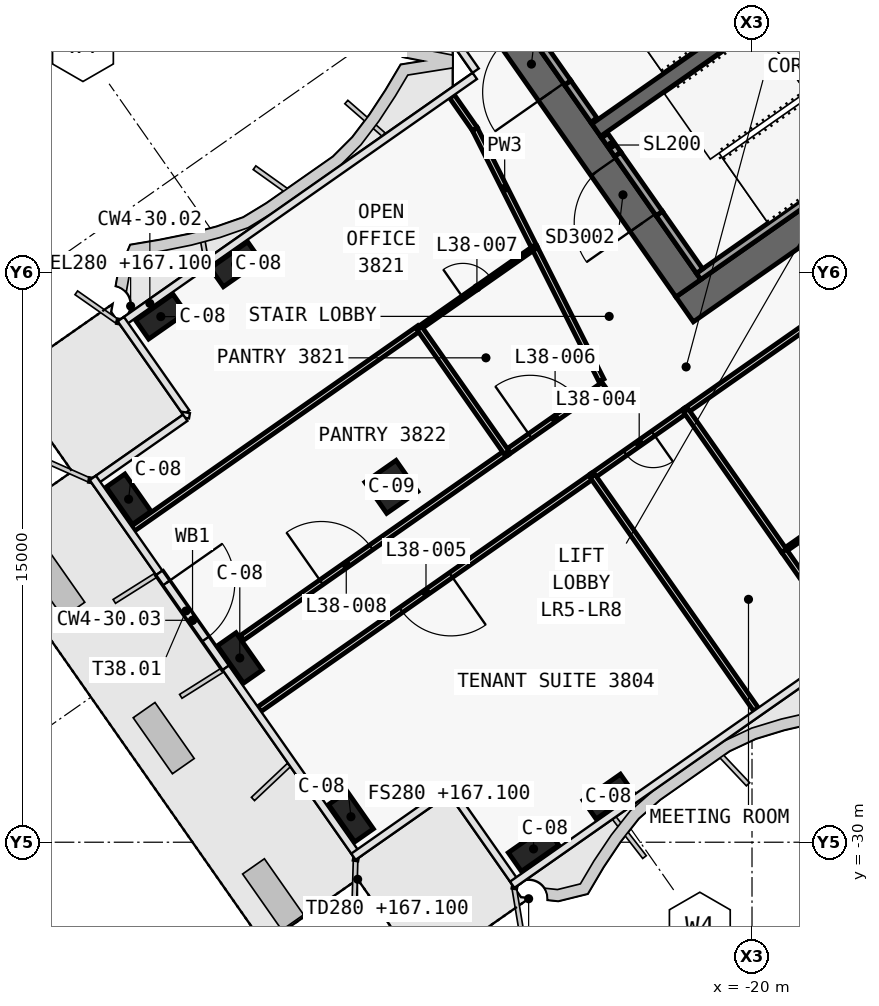
"""IFC4 building model, lengths in metres.
Left out: names, types, materials, properties, quantities, classifications, styles, units other than length and angle.
Written with IfcOpenShell. Run it as: python <this file> out.ifc"""

import sys

from ifc_helpers import new_model, si_unit, direction, frame, frame_2d, origin, origin_2d, place, context, subcontext, project, spatial, polyline, rectangle, outline, extrude, element, fill, save


model = new_model("IFC4")
c1 = context("Model", 3, precision=1e-05, world=origin(), true_north=direction((0.0, 1.0)))
c2 = subcontext(c1, "Body", "Model", "MODEL_VIEW")
j1 = project(units=[si_unit("LENGTHUNIT", "METRE"), si_unit("PLANEANGLEUNIT", "RADIAN")], contexts=[c1])
p1 = place(None, origin())
s1 = spatial("IfcSite", under=j1, at=p1, CompositionType="ELEMENT")
p2 = place(p1, origin())
s2 = spatial("IfcBuilding", under=s1, at=p2, CompositionType="ELEMENT")
p3 = place(p2, frame((0.0, 0.0, 167.1)))
s3 = spatial("IfcBuildingStorey", under=s2, at=p3, CompositionType="ELEMENT", Elevation=167.1)
p4 = place(p3, frame((0.029, -0.712, 0.0), z_axis=(0.0, 0.0, 1.0), x_axis=(-0.819151758019, -0.573576845187, 0.0)))
e1 = element("IfcWall", 1, at=p4, inside=s3, PredefinedType="SHEAR", context=c2, shape_type="SweptSolid", body=[
    extrude(outline(polyline([(26.616, 0.4), (0.56, 0.4), (-0.0, -0.4), (26.616, -0.4), (26.616, 0.4)])), origin(), (0.0, 0.0, 1.0), 3.9),
])
p5 = place(p4, frame((2.966, 0.0, 0.0)))
e2 = element("IfcOpeningElement", 2, at=p5, cuts=e1, PredefinedType="OPENING", context=c2, shape_type="SweptSolid", body=[
    extrude(rectangle(XDim=2.4, YDim=2.1, at=frame_2d((1.2, 1.05))), frame((0.0, 0.41, 0.0), z_axis=(0.0, -1.0, 0.0), x_axis=(1.0, 0.0, 0.0)), (0.0, 0.0, 1.0), 0.82),
])
p6 = place(p4, frame((11.916, 0.0, 0.0)))
e3 = element("IfcOpeningElement", 3, at=p6, cuts=e1, PredefinedType="OPENING", context=c2, shape_type="SweptSolid", body=[
    extrude(rectangle(XDim=2.4, YDim=2.1, at=frame_2d((1.2, 1.05))), frame((0.0, 0.41, 0.0), z_axis=(0.0, -1.0, 0.0), x_axis=(1.0, 0.0, 0.0)), (0.0, 0.0, 1.0), 0.82),
])
p7 = place(p3, frame((-21.675, -15.421, 0.0), z_axis=(0.0, 0.0, 1.0), x_axis=(-0.573581815061, 0.819148278049, 0.0)))
e4 = element("IfcWall", 4, at=p7, inside=s3, PredefinedType="SHEAR", context=c2, shape_type="SweptSolid", body=[
    extrude(outline(polyline([(0.0, 0.4), (0.0, -0.4), (9.6, -0.4), (9.6, 0.4), (0.0, 0.4)])), origin(), (0.0, 0.0, 1.0), 3.9),
])
p8 = place(p7, frame((6.3, 0.0, 0.0)))
e5 = element("IfcOpeningElement", 5, at=p8, cuts=e4, PredefinedType="OPENING", context=c2, shape_type="SweptSolid", body=[
    extrude(rectangle(XDim=1.8, YDim=2.1, at=frame_2d((0.9, 1.05))), frame((0.0, 0.41, 0.0), z_axis=(0.0, -1.0, 0.0), x_axis=(1.0, 0.0, 0.0)), (0.0, 0.0, 1.0), 0.82),
])
p9 = place(p7, frame((2.1, 0.0, 0.0)))
e6 = element("IfcOpeningElement", 6, at=p9, cuts=e4, PredefinedType="OPENING", context=c2, shape_type="SweptSolid", body=[
    extrude(rectangle(XDim=1.8, YDim=2.1, at=frame_2d((0.9, 1.05))), frame((0.0, 0.41, 0.0), z_axis=(0.0, -1.0, 0.0), x_axis=(1.0, 0.0, 0.0)), (0.0, 0.0, 1.0), 0.82),
])
p10 = place(p3, frame((-2.638, 3.768, 0.0), z_axis=(0.0, 0.0, 1.0), x_axis=(-0.81915267502, -0.573575535572, 0.0)))
e7 = element("IfcWall", 7, at=p10, inside=s3, PredefinedType="SHEAR", context=c2, shape_type="SweptSolid", body=[
    extrude(outline(polyline([(26.2, 0.2), (0.0, 0.2), (0.0, -0.2), (26.2, -0.2), (26.2, 0.2)])), origin(), (0.0, 0.0, 1.0), 3.9),
])
p11 = place(p10, frame((1.169, 0.0, 0.0)))
e8 = element("IfcOpeningElement", 8, at=p11, cuts=e7, PredefinedType="OPENING", context=c2, shape_type="SweptSolid", body=[
    extrude(rectangle(XDim=1.1, YDim=2.1, at=frame_2d((0.55, 1.05))), frame((0.0, 0.21, 0.0), z_axis=(0.0, -1.0, 0.0), x_axis=(1.0, 0.0, 0.0)), (0.0, 0.0, 1.0), 0.42),
])
p12 = place(p10, frame((3.206, 0.0, 0.0)))
e9 = element("IfcOpeningElement", 9, at=p12, cuts=e7, PredefinedType="OPENING", context=c2, shape_type="SweptSolid", body=[
    extrude(rectangle(XDim=1.1, YDim=2.1, at=frame_2d((0.55, 1.05))), frame((0.0, 0.21, 0.0), z_axis=(0.0, -1.0, 0.0), x_axis=(1.0, 0.0, 0.0)), (0.0, 0.0, 1.0), 0.42),
])
p13 = place(p10, frame((5.244, 0.0, 0.0)))
e10 = element("IfcOpeningElement", 10, at=p13, cuts=e7, PredefinedType="OPENING", context=c2, shape_type="SweptSolid", body=[
    extrude(rectangle(XDim=1.1, YDim=2.1, at=frame_2d((0.55, 1.05))), frame((0.0, 0.21, 0.0), z_axis=(0.0, -1.0, 0.0), x_axis=(1.0, 0.0, 0.0)), (0.0, 0.0, 1.0), 0.42),
])
p14 = place(p10, frame((7.281, 0.0, 0.0)))
e11 = element("IfcOpeningElement", 11, at=p14, cuts=e7, PredefinedType="OPENING", context=c2, shape_type="SweptSolid", body=[
    extrude(rectangle(XDim=1.1, YDim=2.1, at=frame_2d((0.55, 1.05))), frame((0.0, 0.21, 0.0), z_axis=(0.0, -1.0, 0.0), x_axis=(1.0, 0.0, 0.0)), (0.0, 0.0, 1.0), 0.42),
])
p15 = place(p10, frame((9.688, 0.0, 0.0)))
e12 = element("IfcOpeningElement", 12, at=p15, cuts=e7, PredefinedType="OPENING", context=c2, shape_type="SweptSolid", body=[
    extrude(rectangle(XDim=1.1, YDim=2.1, at=frame_2d((0.55, 1.05))), frame((0.0, 0.21, 0.0), z_axis=(0.0, -1.0, 0.0), x_axis=(1.0, 0.0, 0.0)), (0.0, 0.0, 1.0), 0.42),
])
p16 = place(p10, frame((11.863, 0.0, 0.0)))
e13 = element("IfcOpeningElement", 13, at=p16, cuts=e7, PredefinedType="OPENING", context=c2, shape_type="SweptSolid", body=[
    extrude(rectangle(XDim=1.1, YDim=2.1, at=frame_2d((0.55, 1.05))), frame((0.0, 0.21, 0.0), z_axis=(0.0, -1.0, 0.0), x_axis=(1.0, 0.0, 0.0)), (0.0, 0.0, 1.0), 0.42),
])
p17 = place(p10, frame((14.038, 0.0, 0.0)))
e14 = element("IfcOpeningElement", 14, at=p17, cuts=e7, PredefinedType="OPENING", context=c2, shape_type="SweptSolid", body=[
    extrude(rectangle(XDim=1.1, YDim=2.1, at=frame_2d((0.55, 1.05))), frame((0.0, 0.21, 0.0), z_axis=(0.0, -1.0, 0.0), x_axis=(1.0, 0.0, 0.0)), (0.0, 0.0, 1.0), 0.42),
])
p18 = place(p10, frame((16.212, 0.0, 0.0)))
e15 = element("IfcOpeningElement", 15, at=p18, cuts=e7, PredefinedType="OPENING", context=c2, shape_type="SweptSolid", body=[
    extrude(rectangle(XDim=1.1, YDim=2.1, at=frame_2d((0.55, 1.05))), frame((0.0, 0.21, 0.0), z_axis=(0.0, -1.0, 0.0), x_axis=(1.0, 0.0, 0.0)), (0.0, 0.0, 1.0), 0.42),
])
for number, where, z_axis, x_axis in (
    (16, (-23.782, -28.799, 0.0), (0.0, 0.0, 1.0), (-0.819, -0.574, 0.0)),
    (17, (-25.748, -30.176, 0.0), (0.0, 0.0, 1.0), (-0.819, -0.574, 0.0)),
    (18, (-33.591, -14.792, 0.0), (0.0, 0.0, 1.0), (-0.819, -0.574, 0.0)),
    (19, (-35.556, -16.168, 0.0), (0.0, 0.0, 1.0), (-0.819, -0.574, 0.0)),
    (20, (-30.553, -29.329, 0.0), (0.0, 0.0, 1.0), (-0.574, 0.819, 0.0)),
    (21, (-33.479, -25.151, 0.0), (0.0, 0.0, 1.0), (-0.574, 0.819, 0.0)),
    (22, (-36.404, -20.973, 0.0), (0.0, 0.0, 1.0), (-0.574, 0.819, 0.0)),
):
    element("IfcColumn", number, at=place(p3, frame(where, z_axis=z_axis, x_axis=x_axis)), inside=s3, PredefinedType="COLUMN", context=c2, shape_type="SweptSolid", body=[
        extrude(rectangle(XDim=1.2, YDim=0.6, at=origin_2d()), origin(), (0.0, 0.0, 1.0), 3.9),
    ])
p19 = place(p3, frame((-29.49, -20.649, 0.0), z_axis=(0.0, 0.0, 1.0), x_axis=(-0.819152044289, -0.573576436351, 0.0)))
e23 = element("IfcColumn", 23, at=p19, inside=s3, PredefinedType="COLUMN", context=c2, shape_type="SweptSolid", body=[
    extrude(rectangle(XDim=1.0, YDim=1.0, at=origin_2d()), origin(), (0.0, 0.0, 1.0), 3.9),
])
p20 = place(p3, frame((-24.162, -10.998, 0.0), z_axis=(0.0, 0.0, 1.0), x_axis=(-0.573612502218, 0.819126789514, 0.0)))
e24 = element("IfcWall", 24, at=p20, inside=s3, PredefinedType="SOLIDWALL", context=c2, shape_type="SweptSolid", body=[
    extrude(rectangle(XDim=1.2, YDim=0.2, at=frame_2d((0.6, 0.0))), origin(), (0.0, 0.0, 1.0), 3.62),
])
p21 = place(p3, frame((-24.85, -10.014, 2.15), z_axis=(0.0, 0.0, 1.0), x_axis=(-0.573505465124, 0.819201734296, 0.0)))
e25 = element("IfcWall", 25, at=p21, inside=s3, PredefinedType="SOLIDWALL", context=c2, shape_type="SweptSolid", body=[
    extrude(rectangle(XDim=1.9, YDim=0.2, at=frame_2d((0.95, 0.0))), origin(), (0.0, 0.0, 1.0), 1.47),
])
p22 = place(p3, frame((-14.851, -10.521, 0.0), z_axis=(0.0, 0.0, 1.0), x_axis=(-0.819141584393, -0.57359137434, 0.0)))
e26 = element("IfcWall", 26, at=p22, inside=s3, PredefinedType="SOLIDWALL", context=c2, shape_type="SweptSolid", body=[
    extrude(rectangle(XDim=8.0, YDim=0.2, at=frame_2d((4.0, 0.0))), origin(), (0.0, 0.0, 1.0), 3.62),
])
p23 = place(p3, frame((-21.38, -14.97, 0.0), z_axis=(0.0, 0.0, 1.0), x_axis=(-0.573559770908, 0.819163713305, 0.0)))
e27 = element("IfcWall", 27, at=p23, inside=s3, PredefinedType="SOLIDWALL", context=c2, shape_type="SweptSolid", body=[
    extrude(rectangle(XDim=1.85, YDim=0.2, at=frame_2d((0.925, 0.0))), origin(), (0.0, 0.0, 1.0), 3.62),
])
p24 = place(p3, frame((-23.531, -11.898, 0.0), z_axis=(0.0, 0.0, 1.0), x_axis=(-0.573708088123, 0.819059844958, 0.0)))
e28 = element("IfcWall", 28, at=p24, inside=s3, PredefinedType="SOLIDWALL", context=c2, shape_type="SweptSolid", body=[
    extrude(rectangle(XDim=0.6, YDim=0.2, at=frame_2d((0.3, 0.0))), origin(), (0.0, 0.0, 1.0), 3.62),
])
p25 = place(p3, frame((-22.441, -13.455, 2.15), z_axis=(0.0, 0.0, 1.0), x_axis=(-0.573591692345, 0.819141361715, 0.0)))
e29 = element("IfcWall", 29, at=p25, inside=s3, PredefinedType="SOLIDWALL", context=c2, shape_type="SweptSolid", body=[
    extrude(rectangle(XDim=1.9, YDim=0.2, at=frame_2d((0.95, 0.0))), origin(), (0.0, 0.0, 1.0), 1.47),
])
p26 = place(p3, frame((-35.579, -22.935, 0.0), z_axis=(0.0, 0.0, 1.0), x_axis=(0.57360481557, -0.819132172213, 0.0)))
e30 = element("IfcWall", 30, at=p26, inside=s3, PredefinedType="SOLIDWALL", context=c2, shape_type="SweptSolid", body=[
    extrude(rectangle(XDim=2.99, YDim=0.2, at=frame_2d((1.495, 0.0))), origin(), (0.0, 0.0, 1.0), 3.62),
])
p27 = place(p26, frame((0.295, 0.0, 0.0)))
e31 = element("IfcOpeningElement", 31, at=p27, cuts=e30, PredefinedType="OPENING", context=c2, shape_type="SweptSolid", body=[
    extrude(rectangle(XDim=1.8, YDim=2.4, at=frame_2d((0.9, 1.2))), frame((0.0, 0.11, 0.0), z_axis=(0.0, -1.0, 0.0), x_axis=(1.0, 0.0, 0.0)), (0.0, 0.0, 1.0), 0.22),
])
p28 = place(p3, frame((-26.46, -19.748, 0.0), z_axis=(0.0, 0.0, 1.0), x_axis=(0.819162096976, 0.573562079359, 0.0)))
e32 = element("IfcWall", 32, at=p28, inside=s3, PredefinedType="PARTITIONING", context=c2, shape_type="SweptSolid", body=[
    extrude(rectangle(XDim=3.121, YDim=0.15, at=frame_2d((1.561, 0.0))), origin(), (0.0, 0.0, 1.0), 3.0),
])
p29 = place(p28, frame((0.76, 0.0, 0.0)))
e33 = element("IfcOpeningElement", 33, at=p29, cuts=e32, PredefinedType="OPENING", context=c2, shape_type="SweptSolid", body=[
    extrude(rectangle(XDim=1.6, YDim=2.1, at=frame_2d((0.8, 1.05))), frame((0.0, 0.085, 0.0), z_axis=(0.0, -1.0, 0.0), x_axis=(1.0, 0.0, 0.0)), (0.0, 0.0, 1.0), 0.17),
])
p30 = place(p3, frame((-33.422, -24.623, 0.0), z_axis=(0.0, 0.0, 1.0), x_axis=(0.819164469643, 0.573558690697, 0.0)))
e34 = element("IfcWall", 34, at=p30, inside=s3, PredefinedType="PARTITIONING", context=c2, shape_type="SweptSolid", body=[
    extrude(rectangle(XDim=8.503, YDim=0.15, at=frame_2d((4.251, 0.0))), origin(), (0.0, 0.0, 1.0), 3.0),
])
p31 = place(p30, frame((2.552, 0.0, 0.0)))
e35 = element("IfcOpeningElement", 35, at=p31, cuts=e34, PredefinedType="OPENING", context=c2, shape_type="SweptSolid", body=[
    extrude(rectangle(XDim=1.6, YDim=2.1, at=frame_2d((0.8, 1.05))), frame((0.0, 0.085, 0.0), z_axis=(0.0, -1.0, 0.0), x_axis=(1.0, 0.0, 0.0)), (0.0, 0.0, 1.0), 0.17),
])
p32 = place(p3, frame((-11.908, -11.757, 0.0), z_axis=(0.0, 0.0, 1.0), x_axis=(-0.81915738424, -0.573568810035, 0.0)))
e36 = element("IfcWall", 36, at=p32, inside=s3, PredefinedType="PARTITIONING", context=c2, shape_type="SweptSolid", body=[
    extrude(rectangle(XDim=12.004, YDim=0.15, at=frame_2d((6.002, 0.0))), origin(), (0.0, 0.0, 1.0), 3.0),
])
p33 = place(p32, frame((5.202, 0.0, 0.0)))
e37 = element("IfcOpeningElement", 37, at=p33, cuts=e36, PredefinedType="OPENING", context=c2, shape_type="SweptSolid", body=[
    extrude(rectangle(XDim=1.6, YDim=2.1, at=frame_2d((0.8, 1.05))), frame((0.0, 0.085, 0.0), z_axis=(0.0, -1.0, 0.0), x_axis=(1.0, 0.0, 0.0)), (0.0, 0.0, 1.0), 0.17),
])
p34 = place(p3, frame((-21.738, -18.639, 0.0), z_axis=(0.0, 0.0, 1.0), x_axis=(-0.819128818764, -0.573609604409, 0.0)))
e38 = element("IfcWall", 38, at=p34, inside=s3, PredefinedType="PARTITIONING", context=c2, shape_type="SweptSolid", body=[
    extrude(rectangle(XDim=3.004, YDim=0.15, at=frame_2d((1.502, 0.0))), origin(), (0.0, 0.0, 1.0), 3.62),
])
p35 = place(p34, frame((1.052, 0.0, 0.0)))
e39 = element("IfcOpeningElement", 39, at=p35, cuts=e38, PredefinedType="OPENING", context=c2, shape_type="SweptSolid", body=[
    extrude(rectangle(XDim=0.9, YDim=2.1, at=frame_2d((0.45, 1.05))), frame((0.0, 0.085, 0.0), z_axis=(0.0, -1.0, 0.0), x_axis=(1.0, 0.0, 0.0)), (0.0, 0.0, 1.0), 0.17),
])
p36 = place(p3, frame((-24.196, -20.36, 0.0), z_axis=(0.0, 0.0, 1.0), x_axis=(-0.819152604668, -0.573575636047, 0.0)))
e40 = element("IfcWall", 40, at=p36, inside=s3, PredefinedType="PARTITIONING", context=c2, shape_type="SweptSolid", body=[
    extrude(rectangle(XDim=10.702, YDim=0.15, at=frame_2d((5.351, 0.0))), origin(), (0.0, 0.0, 1.0), 2.9),
])
p37 = place(p36, frame((4.551, 0.0, 0.0)))
e41 = element("IfcOpeningElement", 41, at=p37, cuts=e40, PredefinedType="OPENING", context=c2, shape_type="SweptSolid", body=[
    extrude(rectangle(XDim=1.6, YDim=2.1, at=frame_2d((0.8, 1.05))), frame((0.0, 0.085, 0.0), z_axis=(0.0, -1.0, 0.0), x_axis=(1.0, 0.0, 0.0)), (0.0, 0.0, 1.0), 0.17),
])
p38 = place(p3, frame((-25.723, -14.35, 0.0), z_axis=(0.0, 0.0, 1.0), x_axis=(-0.44984051111, 0.89310890409, 0.0)))
e42 = element("IfcWall", 42, at=p38, inside=s3, PredefinedType="PARTITIONING", context=c2, shape_type="SweptSolid", body=[
    extrude(rectangle(XDim=3.492, YDim=0.15, at=frame_2d((1.746, 0.0))), origin(), (0.0, 0.0, 1.0), 3.62),
])
p39 = place(p3, frame((-27.294, -11.232, 0.0), z_axis=(0.0, 0.0, 1.0), x_axis=(-0.573525032608, 0.819188035174, 0.0)))
e43 = element("IfcWall", 43, at=p39, inside=s3, PredefinedType="PARTITIONING", context=c2, shape_type="SweptSolid", body=[
    extrude(rectangle(XDim=1.045, YDim=0.15, at=frame_2d((0.523, 0.0))), origin(), (0.0, 0.0, 1.0), 3.0),
])
p40 = place(p3, frame((-23.964, -17.843, 0.0), z_axis=(0.0, 0.0, 1.0), x_axis=(-0.449881820571, 0.893088096169, 0.0)))
e44 = element("IfcWall", 44, at=p40, inside=s3, PredefinedType="PARTITIONING", context=c2, shape_type="SweptSolid", body=[
    extrude(rectangle(XDim=3.913, YDim=0.15, at=frame_2d((1.957, 0.0))), origin(), (0.0, 0.0, 1.0), 3.0),
])
p41 = place(p3, frame((-28.753, -16.47, 0.0), z_axis=(0.0, 0.0, 1.0), x_axis=(0.819148177905, 0.57358195808, 0.0)))
e45 = element("IfcWall", 45, at=p41, inside=s3, PredefinedType="PARTITIONING", context=c2, shape_type="SweptSolid", body=[
    extrude(rectangle(XDim=3.698, YDim=0.1, at=frame_2d((1.849, 0.0))), origin(), (0.0, 0.0, 1.0), 3.62),
])
p42 = place(p41, frame((1.399, 0.0, 0.0)))
e46 = element("IfcOpeningElement", 46, at=p42, cuts=e45, PredefinedType="OPENING", context=c2, shape_type="SweptSolid", body=[
    extrude(rectangle(XDim=0.9, YDim=2.1, at=frame_2d((0.45, 1.05))), frame((0.0, 0.06, 0.0), z_axis=(0.0, -1.0, 0.0), x_axis=(1.0, 0.0, 0.0)), (0.0, 0.0, 1.0), 0.12),
])
p43 = place(p3, frame((-28.753, -16.47, 0.0), z_axis=(0.0, 0.0, 1.0), x_axis=(-0.819152122709, -0.573576324356, 0.0)))
e47 = element("IfcWall", 47, at=p43, inside=s3, PredefinedType="PARTITIONING", context=c2, shape_type="SweptSolid", body=[
    extrude(rectangle(XDim=9.2, YDim=0.15, at=frame_2d((4.6, 0.0))), origin(), (0.0, 0.0, 1.0), 2.9),
])
p44 = place(p3, frame((-26.458, -19.747, 0.0), z_axis=(0.0, 0.0, 1.0), x_axis=(-0.573556557423, 0.819165963305, 0.0)))
e48 = element("IfcWall", 48, at=p44, inside=s3, PredefinedType="PARTITIONING", context=c2, shape_type="SweptSolid", body=[
    extrude(rectangle(XDim=4.0, YDim=0.15, at=frame_2d((2.0, 0.0))), origin(), (0.0, 0.0, 1.0), 3.0),
])
p45 = place(p3, frame((-9.328, -15.445, 0.0), z_axis=(0.0, 0.0, 1.0), x_axis=(-0.819146845232, -0.573583861302, 0.0)))
e49 = element("IfcWall", 49, at=p45, inside=s3, PredefinedType="PARTITIONING", context=c2, shape_type="SweptSolid", body=[
    extrude(rectangle(XDim=12.0, YDim=0.1, at=frame_2d((6.0, 0.0))), origin(), (0.0, 0.0, 1.0), 3.0),
])
p46 = place(p45, frame((5.55, 0.0, 0.0)))
e50 = element("IfcOpeningElement", 50, at=p46, cuts=e49, PredefinedType="OPENING", context=c2, shape_type="SweptSolid", body=[
    extrude(rectangle(XDim=0.9, YDim=2.1, at=frame_2d((0.45, 1.05))), frame((0.0, 0.06, 0.0), z_axis=(0.0, -1.0, 0.0), x_axis=(1.0, 0.0, 0.0)), (0.0, 0.0, 1.0), 0.12),
])
p47 = place(p3, frame((-17.438, -24.784, 0.0), z_axis=(0.0, 0.0, 1.0), x_axis=(-0.573604390867, 0.819132469615, 0.0)))
e51 = element("IfcWall", 51, at=p47, inside=s3, PredefinedType="PARTITIONING", context=c2, shape_type="SweptSolid", body=[
    extrude(rectangle(XDim=2.999, YDim=0.15, at=frame_2d((1.5, 0.0))), origin(), (0.0, 0.0, 1.0), 2.9),
])
p48 = place(p3, frame((-19.159, -22.327, 0.0), z_axis=(0.0, 0.0, 1.0), x_axis=(-0.573586141663, 0.819145248471, 0.0)))
e52 = element("IfcWall", 52, at=p48, inside=s3, PredefinedType="PARTITIONING", context=c2, shape_type="SweptSolid", body=[
    extrude(rectangle(XDim=4.5, YDim=0.15, at=frame_2d((2.25, 0.0))), origin(), (0.0, 0.0, 1.0), 3.62),
])
p49 = place(p3, frame((-19.896, -26.505, 0.0), z_axis=(0.0, 0.0, 1.0), x_axis=(-0.573575945067, 0.81915238829, 0.0)))
e53 = element("IfcWall", 53, at=p49, inside=s3, PredefinedType="PARTITIONING", context=c2, shape_type="SweptSolid", body=[
    extrude(rectangle(XDim=7.5, YDim=0.15, at=frame_2d((3.75, 0.0))), origin(), (0.0, 0.0, 1.0), 2.9),
])
p50 = place(p8, origin())
e54 = element("IfcDoor", 54, at=p50, inside=s3, OperationType="DOUBLE_DOOR_SINGLE_SWING", PredefinedType="DOOR", context=c2, shape_type="SweptSolid", body=[
    extrude(rectangle(XDim=1.8, YDim=2.1, at=frame_2d((0.9, 1.05))), frame((0.0, 0.025, 0.0), z_axis=(0.0, -1.0, 0.0), x_axis=(1.0, 0.0, 0.0)), (0.0, 0.0, 1.0), 0.05),
])
fill(e5, e54)
p51 = place(p9, origin())
e55 = element("IfcDoor", 55, at=p51, inside=s3, OperationType="DOUBLE_DOOR_SINGLE_SWING", PredefinedType="DOOR", context=c2, shape_type="SweptSolid", body=[
    extrude(rectangle(XDim=1.8, YDim=2.1, at=frame_2d((0.9, 1.05))), frame((0.0, 0.025, 0.0), z_axis=(0.0, -1.0, 0.0), x_axis=(1.0, 0.0, 0.0)), (0.0, 0.0, 1.0), 0.05),
])
fill(e6, e55)
p52 = place(p27, origin())
e56 = element("IfcDoor", 56, at=p52, inside=s3, OperationType="DOUBLE_DOOR_DOUBLE_SWING", PredefinedType="DOOR", context=c2, shape_type="SweptSolid", body=[
    extrude(rectangle(XDim=1.8, YDim=2.4, at=frame_2d((0.9, 1.2))), frame((0.0, 0.025, 0.0), z_axis=(0.0, -1.0, 0.0), x_axis=(1.0, 0.0, 0.0)), (0.0, 0.0, 1.0), 0.05),
])
fill(e31, e56)
p53 = place(p35, origin())
e57 = element("IfcDoor", 57, at=p53, inside=s3, OperationType="SINGLE_SWING_LEFT", PredefinedType="DOOR", context=c2, shape_type="SweptSolid", body=[
    extrude(rectangle(XDim=0.9, YDim=2.1, at=frame_2d((0.45, 1.05))), frame((0.0, 0.025, 0.0), z_axis=(0.0, -1.0, 0.0), x_axis=(1.0, 0.0, 0.0)), (0.0, 0.0, 1.0), 0.05),
])
fill(e39, e57)
p54 = place(p37, origin())
e58 = element("IfcDoor", 58, at=p54, inside=s3, OperationType="DOUBLE_DOOR_SINGLE_SWING", PredefinedType="DOOR", context=c2, shape_type="SweptSolid", body=[
    extrude(rectangle(XDim=1.6, YDim=2.1, at=frame_2d((0.8, 1.05))), frame((0.0, 0.025, 0.0), z_axis=(0.0, -1.0, 0.0), x_axis=(1.0, 0.0, 0.0)), (0.0, 0.0, 1.0), 0.05),
])
fill(e41, e58)
p55 = place(p29, origin())
e59 = element("IfcDoor", 59, at=p55, inside=s3, OperationType="DOUBLE_DOOR_SINGLE_SWING", PredefinedType="DOOR", context=c2, shape_type="SweptSolid", body=[
    extrude(rectangle(XDim=1.6, YDim=2.1, at=frame_2d((0.8, 1.05))), frame((0.0, 0.025, 0.0), z_axis=(0.0, -1.0, 0.0), x_axis=(1.0, 0.0, 0.0)), (0.0, 0.0, 1.0), 0.05),
])
fill(e33, e59)
p56 = place(p42, origin())
e60 = element("IfcDoor", 60, at=p56, inside=s3, OperationType="SINGLE_SWING_LEFT", PredefinedType="DOOR", context=c2, shape_type="SweptSolid", body=[
    extrude(rectangle(XDim=0.9, YDim=2.1, at=frame_2d((0.45, 1.05))), frame((0.0, 0.025, 0.0), z_axis=(0.0, -1.0, 0.0), x_axis=(1.0, 0.0, 0.0)), (0.0, 0.0, 1.0), 0.05),
])
fill(e46, e60)
p57 = place(p31, origin())
e61 = element("IfcDoor", 61, at=p57, inside=s3, OperationType="DOUBLE_DOOR_SINGLE_SWING", PredefinedType="DOOR", context=c2, shape_type="SweptSolid", body=[
    extrude(rectangle(XDim=1.6, YDim=2.1, at=frame_2d((0.8, 1.05))), frame((0.0, 0.025, 0.0), z_axis=(0.0, -1.0, 0.0), x_axis=(1.0, 0.0, 0.0)), (0.0, 0.0, 1.0), 0.05),
])
fill(e35, e61)
save(model, sys.argv[1])
